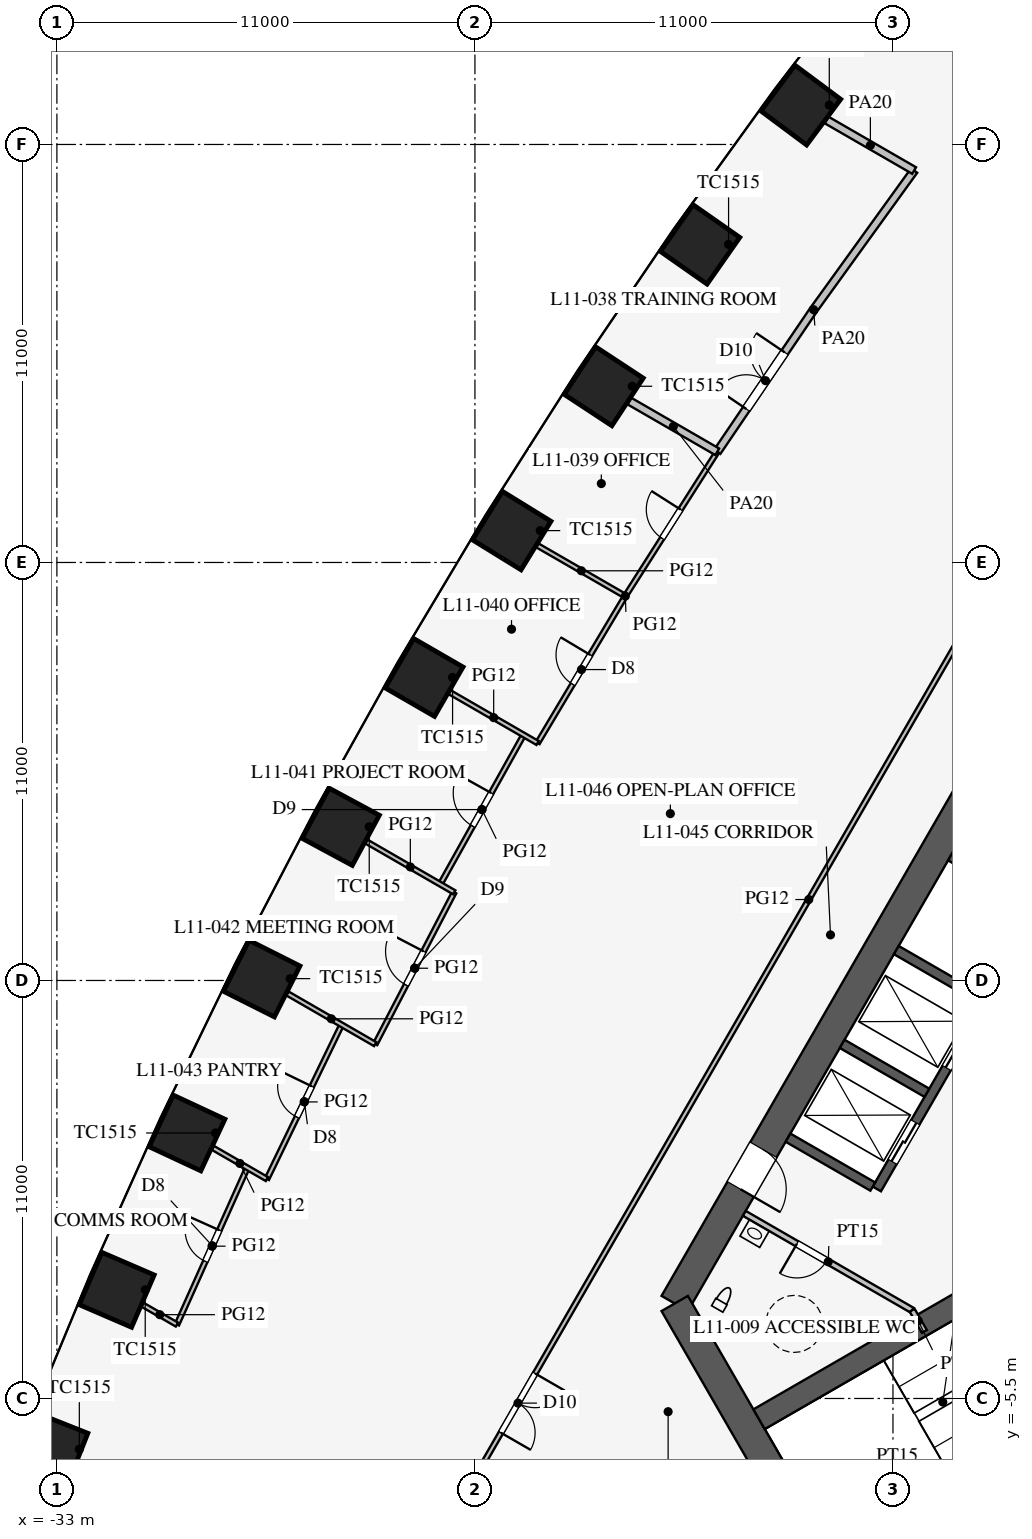
"""IFC4 building model, lengths in metres.
Left out: names, types, materials, properties, quantities, classifications, styles, units other than length and angle.
Written with IfcOpenShell. Run it as: python <this file> out.ifc"""

import sys

from ifc_helpers import new_model, si_unit, direction, frame, frame_2d, origin, origin_2d, place, context, subcontext, project, spatial, rectangle, extrude, element, fill, save


model = new_model("IFC4")
c1 = context("Model", 3, precision=1e-05, world=origin(), true_north=direction((0.0, 1.0)))
c2 = subcontext(c1, "Body", "Model", "MODEL_VIEW")
j1 = project(units=[si_unit("LENGTHUNIT", "METRE"), si_unit("PLANEANGLEUNIT", "RADIAN")], contexts=[c1])
p1 = place(None, origin())
s1 = spatial("IfcSite", under=j1, at=p1, CompositionType="ELEMENT")
p2 = place(p1, origin())
s2 = spatial("IfcBuilding", under=s1, at=p2, CompositionType="ELEMENT")
p3 = place(p2, frame((0.0, 0.0, 50.1)))
s3 = spatial("IfcBuildingStorey", under=s2, at=p3, CompositionType="ELEMENT", Elevation=50.1)
for number, where, z_axis, x_axis in (
    (1, (-13.426, 28.536, 0.0), (0.0, 0.0, 1.0), (-0.597, -0.802, 0.0)),
    (2, (-16.076, 24.87, 0.0), (0.0, 0.0, 1.0), (-0.574, -0.819, 0.0)),
    (3, (-18.611, 21.137, 0.0), (0.0, 0.0, 1.0), (-0.549, -0.836, 0.0)),
    (4, (-21.031, 17.339, 0.0), (0.0, 0.0, 1.0), (-0.525, -0.851, 0.0)),
    (5, (-23.338, 13.474, 0.0), (0.0, 0.0, 1.0), (-0.5, -0.866, 0.0)),
    (6, (-25.531, 9.544, 0.0), (0.0, 0.0, 1.0), (-0.475, -0.88, 0.0)),
    (7, (-27.611, 5.549, 0.0), (0.0, 0.0, 1.0), (-0.449, -0.894, 0.0)),
    (8, (-29.576, 1.487, 0.0), (0.0, 0.0, 1.0), (-0.423, -0.906, 0.0)),
    (9, (-31.426, -2.641, 0.0), (0.0, 0.0, 1.0), (-0.396, -0.918, 0.0)),
    (10, (-33.16, -6.836, 0.0), (0.0, 0.0, 1.0), (-0.369, -0.929, 0.0)),
):
    element("IfcColumn", number, at=place(p3, frame(where, z_axis=z_axis, x_axis=x_axis)), inside=s3, PredefinedType="COLUMN", context=c2, shape_type="SweptSolid", body=[
        extrude(rectangle(XDim=1.5, YDim=1.5, at=origin_2d()), origin(), (0.0, 0.0, 1.0), 4.2),
    ])
p4 = place(p3, frame((-5.773, 16.0, 0.0), z_axis=(0.0, 0.0, 1.0), x_axis=(-0.500002442456, -0.866023993627, 0.0)))
e11 = element("IfcWall", 11, at=p4, inside=s3, PredefinedType="SHEAR", context=c2, shape_type="SweptSolid", body=[
    extrude(rectangle(XDim=21.939, YDim=0.8, at=frame_2d((10.97, 0.0))), origin(), (0.0, 0.0, 1.0), 4.2),
])
p5 = place(p4, frame((17.27, 0.0, 0.0)))
e12 = element("IfcOpeningElement", 12, at=p5, cuts=e11, PredefinedType="OPENING", context=c2, shape_type="SweptSolid", body=[
    extrude(rectangle(XDim=1.2, YDim=2.1, at=frame_2d((0.6, 1.05))), frame((0.0, 0.41, 0.0), z_axis=(0.0, -1.0, 0.0), x_axis=(1.0, 0.0, 0.0)), (0.0, 0.0, 1.0), 0.82),
])
p6 = place(p4, frame((3.47, 0.0, 0.0)))
e13 = element("IfcOpeningElement", 13, at=p6, cuts=e11, PredefinedType="OPENING", context=c2, shape_type="SweptSolid", body=[
    extrude(rectangle(XDim=1.2, YDim=2.1, at=frame_2d((0.6, 1.05))), frame((0.0, 0.41, 0.0), z_axis=(0.0, -1.0, 0.0), x_axis=(1.0, 0.0, 0.0)), (0.0, 0.0, 1.0), 0.82),
])
p7 = place(p3, frame((-16.743, -3.0, 0.0), z_axis=(0.0, 0.0, 1.0), x_axis=(0.499995765644, -0.866027848477, 0.0)))
e14 = element("IfcWall", 14, at=p7, inside=s3, PredefinedType="SHEAR", context=c2, shape_type="SweptSolid", body=[
    extrude(rectangle(XDim=11.547, YDim=0.8, at=frame_2d((5.773, 0.0))), origin(), (0.0, 0.0, 1.0), 4.2),
])
p8 = place(p3, frame((-5.724, 9.886, 0.0), z_axis=(0.0, 0.0, 1.0), x_axis=(-0.500001763848, -0.866024385424, 0.0)))
e15 = element("IfcWall", 15, at=p8, inside=s3, PredefinedType="SHEAR", context=c2, shape_type="SweptSolid", body=[
    extrude(rectangle(XDim=11.4, YDim=0.25, at=frame_2d((5.7, 0.0))), origin(), (0.0, 0.0, 1.0), 4.2),
])
p9 = place(p8, frame((6.525, 0.0, 0.0)))
e16 = element("IfcOpeningElement", 16, at=p9, cuts=e15, PredefinedType="OPENING", context=c2, shape_type="SweptSolid", body=[
    extrude(rectangle(XDim=1.2, YDim=2.2, at=frame_2d((0.6, 1.1))), frame((0.0, 0.135, 0.0), z_axis=(0.0, -1.0, 0.0), x_axis=(1.0, 0.0, 0.0)), (0.0, 0.0, 1.0), 0.27),
])
p10 = place(p8, frame((9.375, 0.0, 0.0)))
e17 = element("IfcOpeningElement", 17, at=p10, cuts=e15, PredefinedType="OPENING", context=c2, shape_type="SweptSolid", body=[
    extrude(rectangle(XDim=1.2, YDim=2.2, at=frame_2d((0.6, 1.1))), frame((0.0, 0.135, 0.0), z_axis=(0.0, -1.0, 0.0), x_axis=(1.0, 0.0, 0.0)), (0.0, 0.0, 1.0), 0.27),
])
for number, where, z_axis, x_axis in (
    (18, (-7.257, 7.481, 0.0), (0.0, 0.0, 1.0), (-0.866, 0.5, 0.0)),
    (19, (-8.682, 5.012, 0.0), (0.0, 0.0, 1.0), (-0.866, 0.5, 0.0)),
    (20, (-10.107, 2.544, 0.0), (0.0, 0.0, 1.0), (-0.866, 0.5, 0.0)),
    (21, (-11.532, 0.076, 0.0), (0.0, 0.0, 1.0), (-0.866, 0.5, 0.0)),
):
    element("IfcWall", number, at=place(p3, frame(where, z_axis=z_axis, x_axis=x_axis)), inside=s3, PredefinedType="SHEAR", context=c2, shape_type="SweptSolid", body=[
        extrude(rectangle(XDim=2.575, YDim=0.25, at=frame_2d((1.288, 0.0))), origin(), (0.0, 0.0, 1.0), 4.2),
    ])
for number, where, z_axis, x_axis in (
    (22, (-6.663, -1.509, 0.0), (0.0, 0.0, 1.0), (-0.866, -0.5, 0.0)),
    (23, (-4.638, -5.016, 0.0), (0.0, 0.0, 1.0), (-0.866, -0.5, 0.0)),
):
    element("IfcWall", number, at=place(p3, frame(where, z_axis=z_axis, x_axis=x_axis)), inside=s3, PredefinedType="SHEAR", context=c2, shape_type="SweptSolid", body=[
        extrude(rectangle(XDim=9.075, YDim=0.6, at=frame_2d((4.538, 0.0))), origin(), (0.0, 0.0, 1.0), 4.2),
    ])
p11 = place(p3, frame((-10.495, -3.178, 0.0), z_axis=(0.0, 0.0, 1.0), x_axis=(-0.86602216432, 0.500005610874, 0.0)))
e24 = element("IfcWall", 24, at=p11, inside=s3, PredefinedType="PARTITIONING", context=c2, shape_type="SweptSolid", body=[
    extrude(rectangle(XDim=5.1, YDim=0.15, at=frame_2d((2.55, 0.0))), origin(), (0.0, 0.0, 1.0), 4.0),
])
p12 = place(p11, frame((2.6, 0.0, 0.0)))
e25 = element("IfcOpeningElement", 25, at=p12, cuts=e24, PredefinedType="OPENING", context=c2, shape_type="SweptSolid", body=[
    extrude(rectangle(XDim=0.9, YDim=2.1, at=frame_2d((0.45, 1.05))), frame((0.0, 0.085, 0.0), z_axis=(0.0, -1.0, 0.0), x_axis=(1.0, 0.0, 0.0)), (0.0, 0.0, 1.0), 0.17),
])
p13 = place(p3, frame((-10.495, -3.178, 0.0), z_axis=(0.0, 0.0, 1.0), x_axis=(0.499842556608, -0.866116284689, 0.0)))
e26 = element("IfcWall", 26, at=p13, inside=s3, PredefinedType="PARTITIONING", context=c2, shape_type="SweptSolid", body=[
    extrude(rectangle(XDim=0.645, YDim=0.15, at=frame_2d((0.323, 0.0))), origin(), (0.0, 0.0, 1.0), 4.0),
])
p14 = place(p3, frame((-0.016, 30.491, 0.0), z_axis=(0.0, 0.0, 1.0), x_axis=(-0.50000091641, -0.866024874695, 0.0)))
e27 = element("IfcWall", 27, at=p14, inside=s3, PredefinedType="PARTITIONING", context=c2, shape_type="SweptSolid", body=[
    extrude(rectangle(XDim=52.796, YDim=0.12, at=frame_2d((26.398, 0.0))), origin(), (0.0, 0.0, 1.0), 2.9),
])
p15 = place(p14, frame((10.2, 0.0, 0.15)))
e28 = element("IfcOpeningElement", 28, at=p15, cuts=e27, PredefinedType="OPENING", context=c2, shape_type="SweptSolid", body=[
    extrude(rectangle(XDim=1.8, YDim=2.1, at=frame_2d((0.9, 1.05))), frame((0.0, 0.07, 0.0), z_axis=(0.0, -1.0, 0.0), x_axis=(1.0, 0.0, 0.0)), (0.0, 0.0, 1.0), 0.14),
])
p16 = place(p14, frame((40.8, 0.0, 0.15)))
e29 = element("IfcOpeningElement", 29, at=p16, cuts=e27, PredefinedType="OPENING", context=c2, shape_type="SweptSolid", body=[
    extrude(rectangle(XDim=1.8, YDim=2.1, at=frame_2d((0.9, 1.05))), frame((0.0, 0.07, 0.0), z_axis=(0.0, -1.0, 0.0), x_axis=(1.0, 0.0, 0.0)), (0.0, 0.0, 1.0), 0.14),
])
p17 = place(p3, frame((-20.719, 11.962, 0.0), z_axis=(0.0, 0.0, 1.0), x_axis=(-0.487392129584, -0.873183206446, 0.0)))
e30 = element("IfcWall", 30, at=p17, inside=s3, PredefinedType="PARTITIONING", context=c2, shape_type="SweptSolid", body=[
    extrude(rectangle(XDim=4.501, YDim=0.12, at=frame_2d((2.25, 0.0))), origin(), (0.0, 0.0, 1.0), 2.9),
])
p18 = place(p17, frame((1.75, 0.0, 0.15)))
e31 = element("IfcOpeningElement", 31, at=p18, cuts=e30, PredefinedType="OPENING", context=c2, shape_type="SweptSolid", body=[
    extrude(rectangle(XDim=1.0, YDim=2.1, at=frame_2d((0.5, 1.05))), frame((0.0, 0.07, 0.0), z_axis=(0.0, -1.0, 0.0), x_axis=(1.0, 0.0, 0.0)), (0.0, 0.0, 1.0), 0.14),
])
p19 = place(p3, frame((-27.989, 0.571, 0.0), z_axis=(0.0, 0.0, 1.0), x_axis=(-0.409430894151, -0.912341132973, 0.0)))
e32 = element("IfcWall", 32, at=p19, inside=s3, PredefinedType="PARTITIONING", context=c2, shape_type="SweptSolid", body=[
    extrude(rectangle(XDim=4.523, YDim=0.12, at=frame_2d((2.262, 0.0))), origin(), (0.0, 0.0, 1.0), 2.9),
])
p20 = place(p19, frame((1.8, 0.0, 0.15)))
e33 = element("IfcOpeningElement", 33, at=p20, cuts=e32, PredefinedType="OPENING", context=c2, shape_type="SweptSolid", body=[
    extrude(rectangle(XDim=0.9, YDim=2.1, at=frame_2d((0.45, 1.05))), frame((0.0, 0.07, 0.0), z_axis=(0.0, -1.0, 0.0), x_axis=(1.0, 0.0, 0.0)), (0.0, 0.0, 1.0), 0.14),
])
p21 = place(p3, frame((-22.544, 7.82, 0.0), z_axis=(0.0, 0.0, 1.0), x_axis=(-0.461810056307, -0.886978845235, 0.0)))
e34 = element("IfcWall", 34, at=p21, inside=s3, PredefinedType="PARTITIONING", context=c2, shape_type="SweptSolid", body=[
    extrude(rectangle(XDim=4.504, YDim=0.12, at=frame_2d((2.252, 0.0))), origin(), (0.0, 0.0, 1.0), 2.9),
])
p22 = place(p21, frame((1.75, 0.0, 0.15)))
e35 = element("IfcOpeningElement", 35, at=p22, cuts=e34, PredefinedType="OPENING", context=c2, shape_type="SweptSolid", body=[
    extrude(rectangle(XDim=1.0, YDim=2.1, at=frame_2d((0.5, 1.05))), frame((0.0, 0.07, 0.0), z_axis=(0.0, -1.0, 0.0), x_axis=(1.0, 0.0, 0.0)), (0.0, 0.0, 1.0), 0.14),
])
p23 = place(p3, frame((-25.508, 4.334, 0.0), z_axis=(0.0, 0.0, 1.0), x_axis=(-0.435857917556, -0.900015486369, 0.0)))
e36 = element("IfcWall", 36, at=p23, inside=s3, PredefinedType="PARTITIONING", context=c2, shape_type="SweptSolid", body=[
    extrude(rectangle(XDim=4.512, YDim=0.12, at=frame_2d((2.256, 0.0))), origin(), (0.0, 0.0, 1.0), 2.9),
])
p24 = place(p23, frame((1.8, 0.0, 0.15)))
e37 = element("IfcOpeningElement", 37, at=p24, cuts=e36, PredefinedType="OPENING", context=c2, shape_type="SweptSolid", body=[
    extrude(rectangle(XDim=0.9, YDim=2.1, at=frame_2d((0.45, 1.05))), frame((0.0, 0.07, 0.0), z_axis=(0.0, -1.0, 0.0), x_axis=(1.0, 0.0, 0.0)), (0.0, 0.0, 1.0), 0.14),
])
p25 = place(p3, frame((-13.091, 23.146, 0.0), z_axis=(0.0, 0.0, 1.0), x_axis=(-0.561512004239, -0.827468591002, 0.0)))
e38 = element("IfcWall", 38, at=p25, inside=s3, PredefinedType="PARTITIONING", context=c2, shape_type="SweptSolid", body=[
    extrude(rectangle(XDim=4.512, YDim=0.2, at=frame_2d((2.256, 0.0))), origin(), (0.0, 0.0, 1.0), 2.9),
])
p26 = place(p25, frame((1.35, 0.0, 0.15)))
e39 = element("IfcOpeningElement", 39, at=p26, cuts=e38, PredefinedType="OPENING", context=c2, shape_type="SweptSolid", body=[
    extrude(rectangle(XDim=1.8, YDim=2.1, at=frame_2d((0.9, 1.05))), frame((0.0, 0.11, 0.0), z_axis=(0.0, -1.0, 0.0), x_axis=(1.0, 0.0, 0.0)), (0.0, 0.0, 1.0), 0.22),
])
p27 = place(p3, frame((-10.443, 26.814, 0.0), z_axis=(0.0, 0.0, 1.0), x_axis=(-0.58534077607, -0.810787380187, 0.0)))
e40 = element("IfcWall", 40, at=p27, inside=s3, PredefinedType="PARTITIONING", context=c2, shape_type="SweptSolid", body=[
    extrude(rectangle(XDim=4.523, YDim=0.2, at=frame_2d((2.262, 0.0))), origin(), (0.0, 0.0, 1.0), 2.9),
])
p28 = place(p3, frame((-18.044, 15.614, 0.0), z_axis=(0.0, 0.0, 1.0), x_axis=(-0.51252396108, -0.858672923364, 0.0)))
e41 = element("IfcWall", 41, at=p28, inside=s3, PredefinedType="PARTITIONING", context=c2, shape_type="SweptSolid", body=[
    extrude(rectangle(XDim=4.5, YDim=0.12, at=frame_2d((2.25, 0.0))), origin(), (0.0, 0.0, 1.0), 2.9),
])
p29 = place(p28, frame((1.8, 0.0, 0.15)))
e42 = element("IfcOpeningElement", 42, at=p29, cuts=e41, PredefinedType="OPENING", context=c2, shape_type="SweptSolid", body=[
    extrude(rectangle(XDim=0.9, YDim=2.1, at=frame_2d((0.45, 1.05))), frame((0.0, 0.07, 0.0), z_axis=(0.0, -1.0, 0.0), x_axis=(1.0, 0.0, 0.0)), (0.0, 0.0, 1.0), 0.14),
])
p30 = place(p3, frame((-15.624, 19.413, 0.0), z_axis=(0.0, 0.0, 1.0), x_axis=(-0.537243691336, -0.843427066272, 0.0)))
e43 = element("IfcWall", 43, at=p30, inside=s3, PredefinedType="PARTITIONING", context=c2, shape_type="SweptSolid", body=[
    extrude(rectangle(XDim=4.504, YDim=0.12, at=frame_2d((2.252, 0.0))), origin(), (0.0, 0.0, 1.0), 2.9),
])
p31 = place(p30, frame((1.8, 0.0, 0.15)))
e44 = element("IfcOpeningElement", 44, at=p31, cuts=e43, PredefinedType="OPENING", context=c2, shape_type="SweptSolid", body=[
    extrude(rectangle(XDim=0.9, YDim=2.1, at=frame_2d((0.45, 1.05))), frame((0.0, 0.07, 0.0), z_axis=(0.0, -1.0, 0.0), x_axis=(1.0, 0.0, 0.0)), (0.0, 0.0, 1.0), 0.14),
])
p32 = place(p3, frame((-20.351, 11.749, 0.0), z_axis=(0.0, 0.0, 1.0), x_axis=(-0.865989150234, 0.500062787734, 0.0)))
e45 = element("IfcWall", 45, at=p32, inside=s3, PredefinedType="PARTITIONING", context=c2, shape_type="SweptSolid", body=[
    extrude(rectangle(XDim=2.67, YDim=0.12, at=frame_2d((1.335, 0.0))), origin(), (0.0, 0.0, 1.0), 2.9),
])
p33 = place(p3, frame((-27.474, 0.274, 0.0), z_axis=(0.0, 0.0, 1.0), x_axis=(-0.865995139556, 0.500052415518, 0.0)))
e46 = element("IfcWall", 46, at=p33, inside=s3, PredefinedType="PARTITIONING", context=c2, shape_type="SweptSolid", body=[
    extrude(rectangle(XDim=1.644, YDim=0.12, at=frame_2d((0.822, 0.0))), origin(), (0.0, 0.0, 1.0), 2.9),
])
p34 = place(p3, frame((-29.841, -3.556, 0.0), z_axis=(0.0, 0.0, 1.0), x_axis=(-0.866033778982, 0.499985493453, 0.0)))
e47 = element("IfcWall", 47, at=p34, inside=s3, PredefinedType="PARTITIONING", context=c2, shape_type="SweptSolid", body=[
    extrude(rectangle(XDim=1.044, YDim=0.12, at=frame_2d((0.522, 0.0))), origin(), (0.0, 0.0, 1.0), 2.9),
])
p35 = place(p3, frame((-22.544, 7.82, 0.0), z_axis=(0.0, 0.0, 1.0), x_axis=(-0.866022619654, 0.500004822225, 0.0)))
e48 = element("IfcWall", 48, at=p35, inside=s3, PredefinedType="PARTITIONING", context=c2, shape_type="SweptSolid", body=[
    extrude(rectangle(XDim=2.669, YDim=0.12, at=frame_2d((1.335, 0.0))), origin(), (0.0, 0.0, 1.0), 2.9),
])
p36 = place(p3, frame((-24.624, 3.824, 0.0), z_axis=(0.0, 0.0, 1.0), x_axis=(-0.866020974757, 0.500007671222, 0.0)))
e49 = element("IfcWall", 49, at=p36, inside=s3, PredefinedType="PARTITIONING", context=c2, shape_type="SweptSolid", body=[
    extrude(rectangle(XDim=2.667, YDim=0.12, at=frame_2d((1.334, 0.0))), origin(), (0.0, 0.0, 1.0), 2.9),
])
p37 = place(p3, frame((-10.443, 26.814, 0.0), z_axis=(0.0, 0.0, 1.0), x_axis=(-0.866031171652, 0.499990009627, 0.0)))
e50 = element("IfcWall", 50, at=p37, inside=s3, PredefinedType="PARTITIONING", context=c2, shape_type="SweptSolid", body=[
    extrude(rectangle(XDim=2.659, YDim=0.2, at=frame_2d((1.33, 0.0))), origin(), (0.0, 0.0, 1.0), 2.9),
])
p38 = place(p3, frame((-18.044, 15.614, 0.0), z_axis=(0.0, 0.0, 1.0), x_axis=(-0.866022619654, 0.500004822225, 0.0)))
e51 = element("IfcWall", 51, at=p38, inside=s3, PredefinedType="PARTITIONING", context=c2, shape_type="SweptSolid", body=[
    extrude(rectangle(XDim=2.669, YDim=0.12, at=frame_2d((1.335, 0.0))), origin(), (0.0, 0.0, 1.0), 2.9),
])
p39 = place(p3, frame((-15.624, 19.413, 0.0), z_axis=(0.0, 0.0, 1.0), x_axis=(-0.866020974757, 0.500007671222, 0.0)))
e52 = element("IfcWall", 52, at=p39, inside=s3, PredefinedType="PARTITIONING", context=c2, shape_type="SweptSolid", body=[
    extrude(rectangle(XDim=2.667, YDim=0.2, at=frame_2d((1.334, 0.0))), origin(), (0.0, 0.0, 1.0), 2.9),
])
p40 = place(p12, origin())
e53 = element("IfcDoor", 53, at=p40, inside=s3, OperationType="SINGLE_SWING_RIGHT", PredefinedType="DOOR", context=c2, shape_type="SweptSolid", body=[
    extrude(rectangle(XDim=0.9, YDim=2.1, at=frame_2d((0.45, 1.05))), frame((0.0, 0.025, 0.0), z_axis=(0.0, -1.0, 0.0), x_axis=(1.0, 0.0, 0.0)), (0.0, 0.0, 1.0), 0.05),
])
fill(e25, e53)
p41 = place(p5, origin())
e54 = element("IfcDoor", 54, at=p41, inside=s3, OperationType="SINGLE_SWING_RIGHT", PredefinedType="DOOR", context=c2, shape_type="SweptSolid", body=[
    extrude(rectangle(XDim=1.2, YDim=2.1, at=frame_2d((0.6, 1.05))), frame((0.0, 0.025, 0.0), z_axis=(0.0, -1.0, 0.0), x_axis=(1.0, 0.0, 0.0)), (0.0, 0.0, 1.0), 0.05),
])
fill(e12, e54)
p42 = place(p26, frame((1.8, 0.0, 0.0), z_axis=(0.0, 0.0, 1.0), x_axis=(-1.0, 0.0, 0.0)))
e55 = element("IfcDoor", 55, at=p42, inside=s3, OperationType="DOUBLE_DOOR_SINGLE_SWING", PredefinedType="DOOR", context=c2, shape_type="SweptSolid", body=[
    extrude(rectangle(XDim=1.8, YDim=2.1, at=frame_2d((0.9, 1.05))), frame((0.0, 0.025, 0.0), z_axis=(0.0, -1.0, 0.0), x_axis=(1.0, 0.0, 0.0)), (0.0, 0.0, 1.0), 0.05),
])
fill(e39, e55)
p43 = place(p31, frame((0.9, 0.0, 0.0), z_axis=(0.0, 0.0, 1.0), x_axis=(-1.0, 0.0, 0.0)))
e56 = element("IfcDoor", 56, at=p43, inside=s3, OperationType="SINGLE_SWING_RIGHT", PredefinedType="DOOR", context=c2, shape_type="SweptSolid", body=[
    extrude(rectangle(XDim=0.9, YDim=2.1, at=frame_2d((0.45, 1.05))), frame((0.0, 0.025, 0.0), z_axis=(0.0, -1.0, 0.0), x_axis=(1.0, 0.0, 0.0)), (0.0, 0.0, 1.0), 0.05),
])
fill(e44, e56)
p44 = place(p29, frame((0.9, 0.0, 0.0), z_axis=(0.0, 0.0, 1.0), x_axis=(-1.0, 0.0, 0.0)))
e57 = element("IfcDoor", 57, at=p44, inside=s3, OperationType="SINGLE_SWING_RIGHT", PredefinedType="DOOR", context=c2, shape_type="SweptSolid", body=[
    extrude(rectangle(XDim=0.9, YDim=2.1, at=frame_2d((0.45, 1.05))), frame((0.0, 0.025, 0.0), z_axis=(0.0, -1.0, 0.0), x_axis=(1.0, 0.0, 0.0)), (0.0, 0.0, 1.0), 0.05),
])
fill(e42, e57)
p45 = place(p18, frame((1.0, 0.0, 0.0), z_axis=(0.0, 0.0, 1.0), x_axis=(-1.0, 0.0, 0.0)))
e58 = element("IfcDoor", 58, at=p45, inside=s3, OperationType="SINGLE_SWING_RIGHT", PredefinedType="DOOR", context=c2, shape_type="SweptSolid", body=[
    extrude(rectangle(XDim=1.0, YDim=2.1, at=frame_2d((0.5, 1.05))), frame((0.0, 0.025, 0.0), z_axis=(0.0, -1.0, 0.0), x_axis=(1.0, 0.0, 0.0)), (0.0, 0.0, 1.0), 0.05),
])
fill(e31, e58)
p46 = place(p22, frame((1.0, 0.0, 0.0), z_axis=(0.0, 0.0, 1.0), x_axis=(-1.0, 0.0, 0.0)))
e59 = element("IfcDoor", 59, at=p46, inside=s3, OperationType="SINGLE_SWING_RIGHT", PredefinedType="DOOR", context=c2, shape_type="SweptSolid", body=[
    extrude(rectangle(XDim=1.0, YDim=2.1, at=frame_2d((0.5, 1.05))), frame((0.0, 0.025, 0.0), z_axis=(0.0, -1.0, 0.0), x_axis=(1.0, 0.0, 0.0)), (0.0, 0.0, 1.0), 0.05),
])
fill(e35, e59)
p47 = place(p24, frame((0.9, 0.0, 0.0), z_axis=(0.0, 0.0, 1.0), x_axis=(-1.0, 0.0, 0.0)))
e60 = element("IfcDoor", 60, at=p47, inside=s3, OperationType="SINGLE_SWING_RIGHT", PredefinedType="DOOR", context=c2, shape_type="SweptSolid", body=[
    extrude(rectangle(XDim=0.9, YDim=2.1, at=frame_2d((0.45, 1.05))), frame((0.0, 0.025, 0.0), z_axis=(0.0, -1.0, 0.0), x_axis=(1.0, 0.0, 0.0)), (0.0, 0.0, 1.0), 0.05),
])
fill(e37, e60)
p48 = place(p20, frame((0.9, 0.0, 0.0), z_axis=(0.0, 0.0, 1.0), x_axis=(-1.0, 0.0, 0.0)))
e61 = element("IfcDoor", 61, at=p48, inside=s3, OperationType="SINGLE_SWING_RIGHT", PredefinedType="DOOR", context=c2, shape_type="SweptSolid", body=[
    extrude(rectangle(XDim=0.9, YDim=2.1, at=frame_2d((0.45, 1.05))), frame((0.0, 0.025, 0.0), z_axis=(0.0, -1.0, 0.0), x_axis=(1.0, 0.0, 0.0)), (0.0, 0.0, 1.0), 0.05),
])
fill(e33, e61)
p49 = place(p16, origin())
e62 = element("IfcDoor", 62, at=p49, inside=s3, OperationType="DOUBLE_DOOR_SINGLE_SWING", PredefinedType="DOOR", context=c2, shape_type="SweptSolid", body=[
    extrude(rectangle(XDim=1.8, YDim=2.1, at=frame_2d((0.9, 1.05))), frame((0.0, 0.025, 0.0), z_axis=(0.0, -1.0, 0.0), x_axis=(1.0, 0.0, 0.0)), (0.0, 0.0, 1.0), 0.05),
])
fill(e29, e62)
p50 = place(p9, origin())
e63 = element("IfcDoor", 63, at=p50, inside=s3, OperationType="DOUBLE_DOOR_SLIDING", PredefinedType="DOOR", context=c2, shape_type="SweptSolid", body=[
    extrude(rectangle(XDim=1.2, YDim=2.2, at=frame_2d((0.6, 1.1))), frame((0.0, 0.025, 0.0), z_axis=(0.0, -1.0, 0.0), x_axis=(1.0, 0.0, 0.0)), (0.0, 0.0, 1.0), 0.05),
])
fill(e16, e63)
p51 = place(p10, origin())
e64 = element("IfcDoor", 64, at=p51, inside=s3, OperationType="DOUBLE_DOOR_SLIDING", PredefinedType="DOOR", context=c2, shape_type="SweptSolid", body=[
    extrude(rectangle(XDim=1.2, YDim=2.2, at=frame_2d((0.6, 1.1))), frame((0.0, 0.025, 0.0), z_axis=(0.0, -1.0, 0.0), x_axis=(1.0, 0.0, 0.0)), (0.0, 0.0, 1.0), 0.05),
])
fill(e17, e64)
save(model, sys.argv[1])
